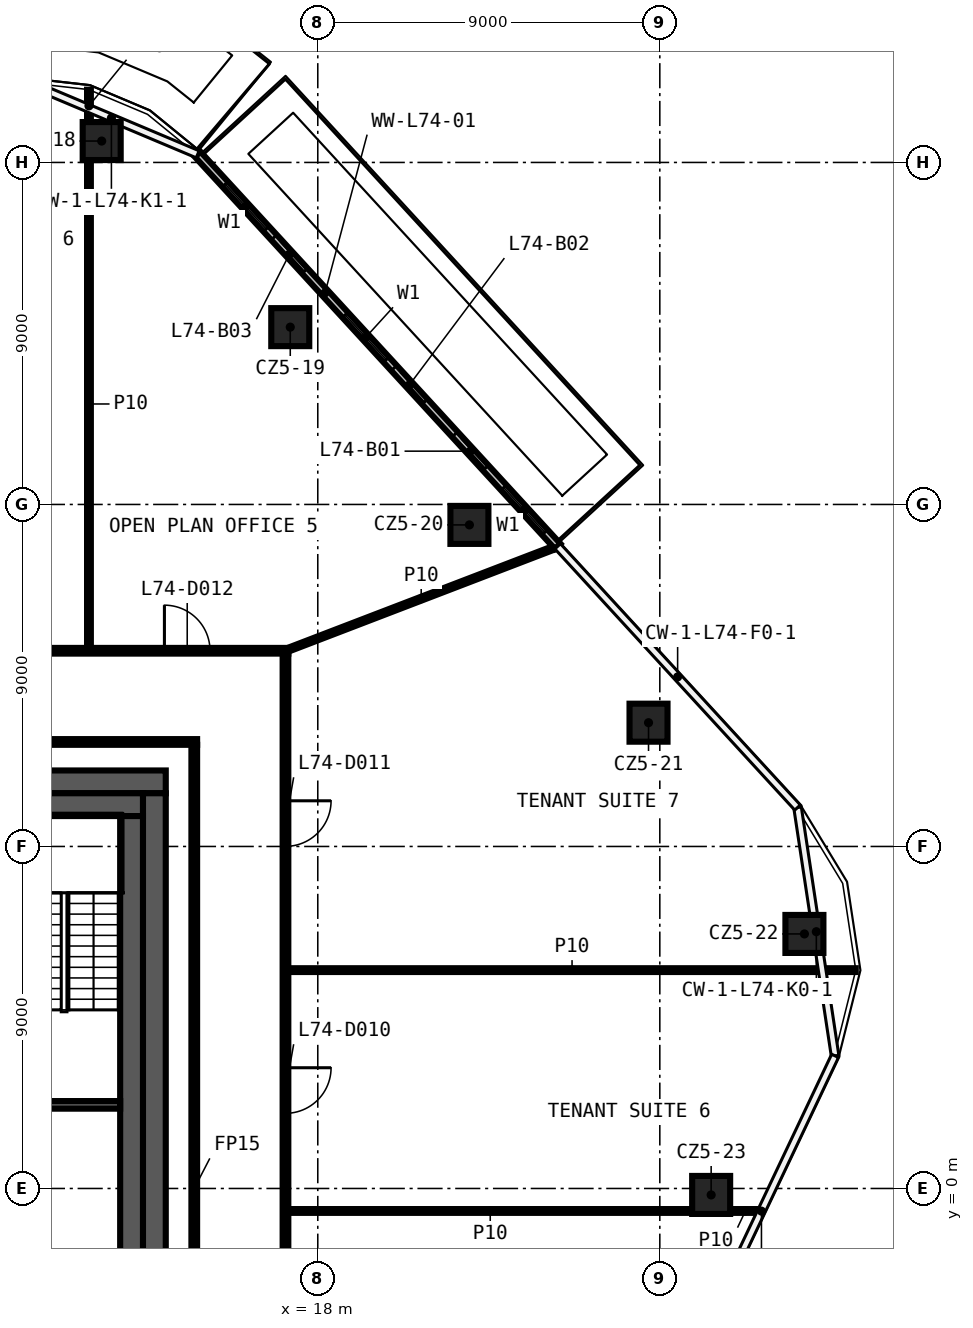
"""IFC4 building model, lengths in metres.
Left out: names, types, materials, properties, quantities, classifications, styles, units other than length and angle.
Written with IfcOpenShell. Run it as: python <this file> out.ifc"""

import sys

from ifc_helpers import new_model, si_unit, direction, frame, frame_2d, origin, origin_2d, place, context, subcontext, project, spatial, rectangle, extrude, element, fill, save


model = new_model("IFC4")
c1 = context("Model", 3, precision=1e-05, world=origin(), true_north=direction((0.0, 1.0)))
c2 = subcontext(c1, "Body", "Model", "MODEL_VIEW")
j1 = project(units=[si_unit("LENGTHUNIT", "METRE"), si_unit("PLANEANGLEUNIT", "RADIAN")], contexts=[c1])
p1 = place(None, origin())
s1 = spatial("IfcSite", under=j1, at=p1, CompositionType="ELEMENT")
p2 = place(p1, origin())
s2 = spatial("IfcBuilding", under=s1, at=p2, CompositionType="ELEMENT")
p3 = place(p2, frame((0.0, 0.0, 344.6)))
s3 = spatial("IfcBuildingStorey", under=s2, at=p3, CompositionType="ELEMENT", Elevation=344.6)
for number, where, z_axis, x_axis in (
    (1, (12.314, 27.563, 0.0), (0.0, 0.0, 1.0), (1.0, 0.0, 0.0)),
    (2, (17.276, 22.666, 0.0), (0.0, 0.0, 1.0), (1.0, 0.0, 0.0)),
    (3, (21.99, 17.462, 0.0), (0.0, 0.0, 1.0), (1.0, 0.0, 0.0)),
    (4, (26.703, 12.257, 0.0), (0.0, 0.0, 1.0), (1.0, 0.0, 0.0)),
    (5, (30.805, 6.698, 0.0), (0.0, 0.0, 1.0), (1.0, 0.0, 0.0)),
    (6, (28.351, -0.17, 0.0), (0.0, 0.0, 1.0), (1.0, 0.0, 0.0)),
):
    element("IfcColumn", number, at=place(p3, frame(where, z_axis=z_axis, x_axis=x_axis)), inside=s3, PredefinedType="COLUMN", context=c2, shape_type="SweptSolid", body=[
        extrude(rectangle(XDim=1.0, YDim=1.0, at=origin_2d()), origin(), (0.0, 0.0, 1.0), 3.82),
    ])
p4 = place(p3, frame((17.225, -0.592, 0.0), z_axis=(0.0, 0.0, 1.0), x_axis=(1.0, 0.0, 0.0)))
e7 = element("IfcWall", 7, at=p4, inside=s3, PredefinedType="PARTITIONING", context=c2, shape_type="SweptSolid", body=[
    extrude(rectangle(XDim=10.626, YDim=0.1, at=frame_2d((5.313, 0.0))), origin(), (0.0, 0.0, 1.0), 3.82),
])
p5 = place(p3, frame((28.851, -0.592, 0.0), z_axis=(0.0, 0.0, 1.0), x_axis=(1.0, 0.0, 0.0)))
e8 = element("IfcWall", 8, at=p5, inside=s3, PredefinedType="PARTITIONING", context=c2, shape_type="SweptSolid", body=[
    extrude(rectangle(XDim=0.803, YDim=0.1, at=frame_2d((0.402, 0.0))), origin(), (0.0, 0.0, 1.0), 3.82),
])
p6 = place(p3, frame((17.225, 5.746, 0.0), z_axis=(0.0, 0.0, 1.0), x_axis=(1.0, 0.0, 0.0)))
e9 = element("IfcWall", 9, at=p6, inside=s3, PredefinedType="PARTITIONING", context=c2, shape_type="SweptSolid", body=[
    extrude(rectangle(XDim=14.931, YDim=0.1, at=frame_2d((7.466, 0.0))), origin(), (0.0, 0.0, 1.0), 3.82),
])
p7 = place(p3, frame((3.6, 11.75, 0.0), z_axis=(0.0, 0.0, 1.0), x_axis=(1.0, 0.0, 0.0)))
e10 = element("IfcWall", 10, at=p7, inside=s3, PredefinedType="PARTITIONING", context=c2, shape_type="SweptSolid", body=[
    extrude(rectangle(XDim=11.225, YDim=0.15, at=frame_2d((5.612, 0.0))), origin(), (0.0, 0.0, 1.0), 3.82),
])
p8 = place(p3, frame((-17.225, 14.15, 0.0), z_axis=(0.0, 0.0, 1.0), x_axis=(1.0, 0.0, 0.0)))
e11 = element("IfcWall", 11, at=p8, inside=s3, PredefinedType="PARTITIONING", context=c2, shape_type="SweptSolid", body=[
    extrude(rectangle(XDim=34.45, YDim=0.15, at=frame_2d((17.225, 0.0))), origin(), (0.0, 0.0, 1.0), 3.82),
])
p9 = place(p8, frame((31.19, 0.0, 0.0)))
e12 = element("IfcOpeningElement", 12, at=p9, cuts=e11, PredefinedType="OPENING", context=c2, shape_type="SweptSolid", body=[
    extrude(rectangle(XDim=1.2, YDim=2.1, at=frame_2d((0.6, 1.05))), frame((0.0, 0.085, 0.0), z_axis=(0.0, -1.0, 0.0), x_axis=(1.0, 0.0, 0.0)), (0.0, 0.0, 1.0), 0.17),
])
p10 = place(p8, frame((24.621, 0.0, 0.0)))
e13 = element("IfcOpeningElement", 13, at=p10, cuts=e11, PredefinedType="OPENING", context=c2, shape_type="SweptSolid", body=[
    extrude(rectangle(XDim=1.2, YDim=2.1, at=frame_2d((0.6, 1.05))), frame((0.0, 0.085, 0.0), z_axis=(0.0, -1.0, 0.0), x_axis=(1.0, 0.0, 0.0)), (0.0, 0.0, 1.0), 0.17),
])
p11 = place(p8, frame((17.703, 0.0, 0.0)))
e14 = element("IfcOpeningElement", 14, at=p11, cuts=e11, PredefinedType="OPENING", context=c2, shape_type="SweptSolid", body=[
    extrude(rectangle(XDim=1.2, YDim=2.1, at=frame_2d((0.6, 1.05))), frame((0.0, 0.085, 0.0), z_axis=(0.0, -1.0, 0.0), x_axis=(1.0, 0.0, 0.0)), (0.0, 0.0, 1.0), 0.17),
])
p12 = place(p8, frame((10.781, 0.0, 0.0)))
e15 = element("IfcOpeningElement", 15, at=p12, cuts=e11, PredefinedType="OPENING", context=c2, shape_type="SweptSolid", body=[
    extrude(rectangle(XDim=1.2, YDim=2.1, at=frame_2d((0.6, 1.05))), frame((0.0, 0.085, 0.0), z_axis=(0.0, -1.0, 0.0), x_axis=(1.0, 0.0, 0.0)), (0.0, 0.0, 1.0), 0.17),
])
p13 = place(p8, frame((6.171, 0.0, 0.0)))
e16 = element("IfcOpeningElement", 16, at=p13, cuts=e11, PredefinedType="OPENING", context=c2, shape_type="SweptSolid", body=[
    extrude(rectangle(XDim=1.2, YDim=2.1, at=frame_2d((0.6, 1.05))), frame((0.0, 0.085, 0.0), z_axis=(0.0, -1.0, 0.0), x_axis=(1.0, 0.0, 0.0)), (0.0, 0.0, 1.0), 0.17),
])
p14 = place(p8, frame((1.932, 0.0, 0.0)))
e17 = element("IfcOpeningElement", 17, at=p14, cuts=e11, PredefinedType="OPENING", context=c2, shape_type="SweptSolid", body=[
    extrude(rectangle(XDim=1.2, YDim=2.1, at=frame_2d((0.6, 1.05))), frame((0.0, 0.085, 0.0), z_axis=(0.0, -1.0, 0.0), x_axis=(1.0, 0.0, 0.0)), (0.0, 0.0, 1.0), 0.17),
])
p15 = place(p3, frame((17.15, 14.15, 0.0), z_axis=(0.0, 0.0, 1.0), x_axis=(0.933641376905, 0.358209127927, 0.0)))
e18 = element("IfcWall", 18, at=p15, inside=s3, PredefinedType="PARTITIONING", context=c2, shape_type="SweptSolid", body=[
    extrude(rectangle(XDim=7.65, YDim=0.1, at=frame_2d((3.825, 0.0))), origin(), (0.0, 0.0, 1.0), 3.82),
])
p16 = place(p3, frame((17.15, 14.075, 0.0), z_axis=(0.0, 0.0, 1.0), x_axis=(0.0, -1.0, 0.0)))
e19 = element("IfcWall", 19, at=p16, inside=s3, PredefinedType="PARTITIONING", context=c2, shape_type="SweptSolid", body=[
    extrude(rectangle(XDim=28.15, YDim=0.15, at=frame_2d((14.075, 0.0))), origin(), (0.0, 0.0, 1.0), 3.82),
])
p17 = place(p16, frame((24.292, 0.0, 0.0)))
e20 = element("IfcOpeningElement", 20, at=p17, cuts=e19, PredefinedType="OPENING", context=c2, shape_type="SweptSolid", body=[
    extrude(rectangle(XDim=1.2, YDim=2.1, at=frame_2d((0.6, 1.05))), frame((0.0, 0.085, 0.0), z_axis=(0.0, -1.0, 0.0), x_axis=(1.0, 0.0, 0.0)), (0.0, 0.0, 1.0), 0.17),
])
p18 = place(p16, frame((10.898, 0.0, 0.0)))
e21 = element("IfcOpeningElement", 21, at=p18, cuts=e19, PredefinedType="OPENING", context=c2, shape_type="SweptSolid", body=[
    extrude(rectangle(XDim=1.2, YDim=2.1, at=frame_2d((0.6, 1.05))), frame((0.0, 0.085, 0.0), z_axis=(0.0, -1.0, 0.0), x_axis=(1.0, 0.0, 0.0)), (0.0, 0.0, 1.0), 0.17),
])
p19 = place(p16, frame((3.873, 0.0, 0.0)))
e22 = element("IfcOpeningElement", 22, at=p19, cuts=e19, PredefinedType="OPENING", context=c2, shape_type="SweptSolid", body=[
    extrude(rectangle(XDim=1.2, YDim=2.1, at=frame_2d((0.6, 1.05))), frame((0.0, 0.085, 0.0), z_axis=(0.0, -1.0, 0.0), x_axis=(1.0, 0.0, 0.0)), (0.0, 0.0, 1.0), 0.17),
])
p20 = place(p3, frame((14.75, -11.675, 0.0), z_axis=(0.0, 0.0, 1.0), x_axis=(0.0, 1.0, 0.0)))
e23 = element("IfcWall", 23, at=p20, inside=s3, PredefinedType="PARTITIONING", context=c2, shape_type="SweptSolid", body=[
    extrude(rectangle(XDim=23.35, YDim=0.15, at=frame_2d((11.675, 0.0))), origin(), (0.0, 0.0, 1.0), 3.82),
])
p21 = place(p3, frame((11.979, 14.225, 0.0), z_axis=(0.0, 0.0, 1.0), x_axis=(0.0, 1.0, 0.0)))
e24 = element("IfcWall", 24, at=p21, inside=s3, PredefinedType="PARTITIONING", context=c2, shape_type="SweptSolid", body=[
    extrude(rectangle(XDim=12.838, YDim=0.1, at=frame_2d((6.419, 0.0))), origin(), (0.0, 0.0, 1.0), 3.82),
])
p22 = place(p3, frame((11.979, 28.063, 0.0), z_axis=(0.0, 0.0, 1.0), x_axis=(0.0, 1.0, 0.0)))
e25 = element("IfcWall", 25, at=p22, inside=s3, PredefinedType="PARTITIONING", context=c2, shape_type="SweptSolid", body=[
    extrude(rectangle(XDim=0.852, YDim=0.1, at=frame_2d((0.426, 0.0))), origin(), (0.0, 0.0, 1.0), 3.82),
])
p23 = place(p3, frame((24.313, 16.898, 0.0), z_axis=(0.0, 0.0, 1.0), x_axis=(-0.676360611012, 0.736570650971, 0.0)))
e26 = element("IfcWall", 26, at=p23, inside=s3, PredefinedType="SOLIDWALL", context=c2, shape_type="SweptSolid", body=[
    extrude(rectangle(XDim=14.005, YDim=0.2, at=frame_2d((7.003, 0.0))), origin(), (0.0, 0.0, 1.0), 3.7),
])
p24 = place(p23, frame((0.5, 0.0, 0.6)))
e27 = element("IfcOpeningElement", 27, at=p24, cuts=e26, PredefinedType="OPENING", context=c2, shape_type="SweptSolid", body=[
    extrude(rectangle(XDim=1.6, YDim=2.4, at=frame_2d((0.8, 1.2))), frame((0.0, 0.11, 0.0), z_axis=(0.0, -1.0, 0.0), x_axis=(1.0, 0.0, 0.0)), (0.0, 0.0, 1.0), 0.22),
])
p25 = place(p23, frame((2.8, 0.0, 0.0)))
e28 = element("IfcOpeningElement", 28, at=p25, cuts=e26, PredefinedType="OPENING", context=c2, shape_type="SweptSolid", body=[
    extrude(rectangle(XDim=1.2, YDim=2.4, at=frame_2d((0.6, 1.2))), frame((0.0, 0.11, 0.0), z_axis=(0.0, -1.0, 0.0), x_axis=(1.0, 0.0, 0.0)), (0.0, 0.0, 1.0), 0.22),
])
p26 = place(p23, frame((6.668, 0.0, 0.6)))
e29 = element("IfcOpeningElement", 29, at=p26, cuts=e26, PredefinedType="OPENING", context=c2, shape_type="SweptSolid", body=[
    extrude(rectangle(XDim=1.6, YDim=2.4, at=frame_2d((0.8, 1.2))), frame((0.0, 0.11, 0.0), z_axis=(0.0, -1.0, 0.0), x_axis=(1.0, 0.0, 0.0)), (0.0, 0.0, 1.0), 0.22),
])
p27 = place(p23, frame((5.168, 0.0, 0.0)))
e30 = element("IfcOpeningElement", 30, at=p27, cuts=e26, PredefinedType="OPENING", context=c2, shape_type="SweptSolid", body=[
    extrude(rectangle(XDim=1.2, YDim=2.4, at=frame_2d((0.6, 1.2))), frame((0.0, 0.11, 0.0), z_axis=(0.0, -1.0, 0.0), x_axis=(1.0, 0.0, 0.0)), (0.0, 0.0, 1.0), 0.22),
])
p28 = place(p23, frame((11.337, 0.0, 0.6)))
e31 = element("IfcOpeningElement", 31, at=p28, cuts=e26, PredefinedType="OPENING", context=c2, shape_type="SweptSolid", body=[
    extrude(rectangle(XDim=1.6, YDim=2.4, at=frame_2d((0.8, 1.2))), frame((0.0, 0.11, 0.0), z_axis=(0.0, -1.0, 0.0), x_axis=(1.0, 0.0, 0.0)), (0.0, 0.0, 1.0), 0.22),
])
p29 = place(p23, frame((9.837, 0.0, 0.0)))
e32 = element("IfcOpeningElement", 32, at=p29, cuts=e26, PredefinedType="OPENING", context=c2, shape_type="SweptSolid", body=[
    extrude(rectangle(XDim=1.2, YDim=2.4, at=frame_2d((0.6, 1.2))), frame((0.0, 0.11, 0.0), z_axis=(0.0, -1.0, 0.0), x_axis=(1.0, 0.0, 0.0)), (0.0, 0.0, 1.0), 0.22),
])
p30 = place(p3, frame((-14.0, 10.7, 0.0), z_axis=(0.0, 0.0, 1.0), x_axis=(1.0, 0.0, 0.0)))
e33 = element("IfcWall", 33, at=p30, inside=s3, PredefinedType="SHEAR", context=c2, shape_type="SweptSolid", body=[
    extrude(rectangle(XDim=28.0, YDim=0.6, at=frame_2d((14.0, 0.0))), origin(), (0.0, 0.0, 1.0), 3.82),
])
p31 = place(p30, frame((15.9, 0.0, 0.0)))
e34 = element("IfcOpeningElement", 34, at=p31, cuts=e33, PredefinedType="OPENING", context=c2, shape_type="SweptSolid", body=[
    extrude(rectangle(XDim=1.6, YDim=2.1, at=frame_2d((0.8, 1.05))), frame((0.0, 0.31, 0.0), z_axis=(0.0, -1.0, 0.0), x_axis=(1.0, 0.0, 0.0)), (0.0, 0.0, 1.0), 0.62),
])
p32 = place(p3, frame((13.7, 10.4, 0.0), z_axis=(0.0, 0.0, 1.0), x_axis=(0.0, -1.0, 0.0)))
e35 = element("IfcWall", 35, at=p32, inside=s3, PredefinedType="SHEAR", context=c2, shape_type="SweptSolid", body=[
    extrude(rectangle(XDim=20.8, YDim=0.6, at=frame_2d((10.4, 0.0))), origin(), (0.0, 0.0, 1.0), 3.82),
])
p33 = place(p3, frame((3.9, 10.1, 0.0), z_axis=(0.0, 0.0, 1.0), x_axis=(1.0, 0.0, 0.0)))
e36 = element("IfcWall", 36, at=p33, inside=s3, PredefinedType="SHEAR", context=c2, shape_type="SweptSolid", body=[
    extrude(rectangle(XDim=9.5, YDim=0.6, at=frame_2d((4.75, 0.0))), origin(), (0.0, 0.0, 1.0), 3.82),
])
p34 = place(p3, frame((13.1, 9.8, 0.0), z_axis=(0.0, 0.0, 1.0), x_axis=(0.0, -1.0, 0.0)))
e37 = element("IfcWall", 37, at=p34, inside=s3, PredefinedType="SHEAR", context=c2, shape_type="SweptSolid", body=[
    extrude(rectangle(XDim=19.6, YDim=0.6, at=frame_2d((9.8, 0.0))), origin(), (0.0, 0.0, 1.0), 3.82),
])
p35 = place(p3, frame((9.45, 2.2, 0.0), z_axis=(0.0, 0.0, 1.0), x_axis=(1.0, 0.0, 0.0)))
e38 = element("IfcWall", 38, at=p35, inside=s3, PredefinedType="SHEAR", context=c2, shape_type="SweptSolid", body=[
    extrude(rectangle(XDim=3.35, YDim=0.2, at=frame_2d((1.675, 0.0))), origin(), (0.0, 0.0, 1.0), 3.82),
])
p36 = place(p18, origin())
e39 = element("IfcDoor", 39, at=p36, inside=s3, OperationType="SINGLE_SWING_LEFT", PredefinedType="DOOR", context=c2, shape_type="SweptSolid", body=[
    extrude(rectangle(XDim=1.2, YDim=2.1, at=frame_2d((0.6, 1.05))), frame((0.0, 0.025, 0.0), z_axis=(0.0, -1.0, 0.0), x_axis=(1.0, 0.0, 0.0)), (0.0, 0.0, 1.0), 0.05),
])
fill(e21, e39)
p37 = place(p19, origin())
e40 = element("IfcDoor", 40, at=p37, inside=s3, OperationType="SINGLE_SWING_RIGHT", PredefinedType="DOOR", context=c2, shape_type="SweptSolid", body=[
    extrude(rectangle(XDim=1.2, YDim=2.1, at=frame_2d((0.6, 1.05))), frame((0.0, 0.025, 0.0), z_axis=(0.0, -1.0, 0.0), x_axis=(1.0, 0.0, 0.0)), (0.0, 0.0, 1.0), 0.05),
])
fill(e22, e40)
p38 = place(p9, origin())
e41 = element("IfcDoor", 41, at=p38, inside=s3, OperationType="SINGLE_SWING_LEFT", PredefinedType="DOOR", context=c2, shape_type="SweptSolid", body=[
    extrude(rectangle(XDim=1.2, YDim=2.1, at=frame_2d((0.6, 1.05))), frame((0.0, 0.025, 0.0), z_axis=(0.0, -1.0, 0.0), x_axis=(1.0, 0.0, 0.0)), (0.0, 0.0, 1.0), 0.05),
])
fill(e12, e41)
p39 = place(p24, origin())
e42 = element("IfcWindow", 42, at=p39, inside=s3, PartitioningType="SINGLE_PANEL", PredefinedType="WINDOW", context=c2, shape_type="SweptSolid", body=[
    extrude(rectangle(XDim=1.6, YDim=2.4, at=frame_2d((0.8, 1.2))), frame((0.0, 0.03, 0.0), z_axis=(0.0, -1.0, 0.0), x_axis=(1.0, 0.0, 0.0)), (0.0, 0.0, 1.0), 0.06),
])
fill(e27, e42)
p40 = place(p25, origin())
e43 = element("IfcDoor", 43, at=p40, inside=s3, OperationType="SLIDING_TO_LEFT", PredefinedType="DOOR", context=c2, shape_type="SweptSolid", body=[
    extrude(rectangle(XDim=1.2, YDim=2.4, at=frame_2d((0.6, 1.2))), frame((0.0, 0.025, 0.0), z_axis=(0.0, -1.0, 0.0), x_axis=(1.0, 0.0, 0.0)), (0.0, 0.0, 1.0), 0.05),
])
fill(e28, e43)
p41 = place(p26, origin())
e44 = element("IfcWindow", 44, at=p41, inside=s3, PartitioningType="SINGLE_PANEL", PredefinedType="WINDOW", context=c2, shape_type="SweptSolid", body=[
    extrude(rectangle(XDim=1.6, YDim=2.4, at=frame_2d((0.8, 1.2))), frame((0.0, 0.03, 0.0), z_axis=(0.0, -1.0, 0.0), x_axis=(1.0, 0.0, 0.0)), (0.0, 0.0, 1.0), 0.06),
])
fill(e29, e44)
p42 = place(p27, origin())
e45 = element("IfcDoor", 45, at=p42, inside=s3, OperationType="SLIDING_TO_LEFT", PredefinedType="DOOR", context=c2, shape_type="SweptSolid", body=[
    extrude(rectangle(XDim=1.2, YDim=2.4, at=frame_2d((0.6, 1.2))), frame((0.0, 0.025, 0.0), z_axis=(0.0, -1.0, 0.0), x_axis=(1.0, 0.0, 0.0)), (0.0, 0.0, 1.0), 0.05),
])
fill(e30, e45)
p43 = place(p28, origin())
e46 = element("IfcWindow", 46, at=p43, inside=s3, PartitioningType="SINGLE_PANEL", PredefinedType="WINDOW", context=c2, shape_type="SweptSolid", body=[
    extrude(rectangle(XDim=1.6, YDim=2.4, at=frame_2d((0.8, 1.2))), frame((0.0, 0.03, 0.0), z_axis=(0.0, -1.0, 0.0), x_axis=(1.0, 0.0, 0.0)), (0.0, 0.0, 1.0), 0.06),
])
fill(e31, e46)
p44 = place(p29, origin())
e47 = element("IfcDoor", 47, at=p44, inside=s3, OperationType="SLIDING_TO_LEFT", PredefinedType="DOOR", context=c2, shape_type="SweptSolid", body=[
    extrude(rectangle(XDim=1.2, YDim=2.4, at=frame_2d((0.6, 1.2))), frame((0.0, 0.025, 0.0), z_axis=(0.0, -1.0, 0.0), x_axis=(1.0, 0.0, 0.0)), (0.0, 0.0, 1.0), 0.05),
])
fill(e32, e47)
save(model, sys.argv[1])
